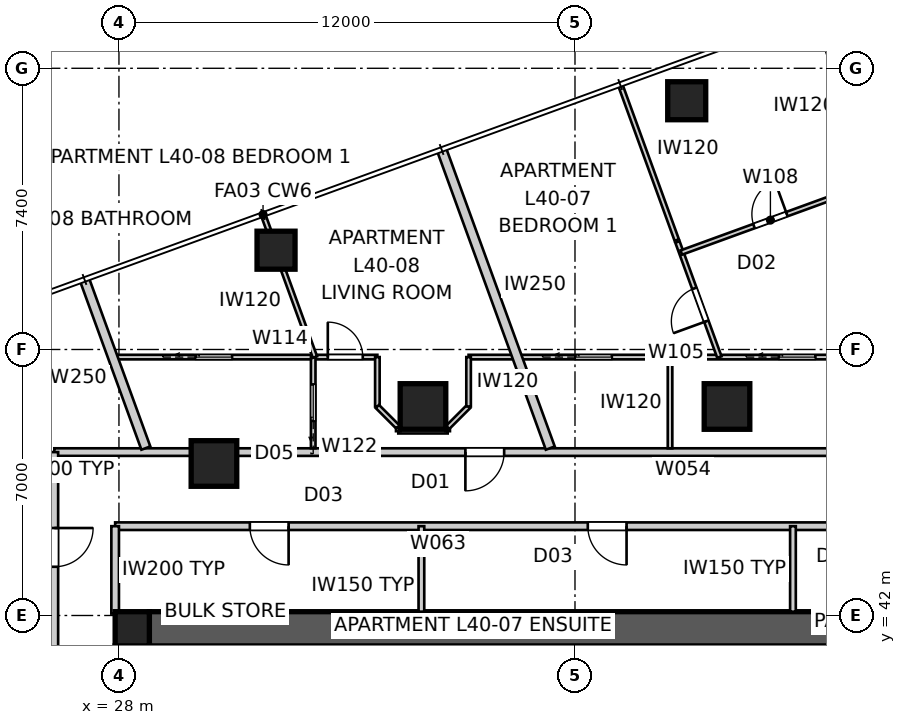
"""IFC4 building model, lengths in metres.
Left out: names, types, materials, properties, quantities, classifications, styles, units other than length and angle.
Written with IfcOpenShell. Run it as: python <this file> out.ifc"""

import sys

from ifc_helpers import new_model, si_unit, direction, frame, frame_2d, origin, origin_2d, place, context, subcontext, project, spatial, polyline, rectangle, outline, extrude, element, fill, save


model = new_model("IFC4")
c1 = context("Model", 3, precision=1e-05, world=origin(), true_north=direction((0.0, 1.0)))
c2 = subcontext(c1, "Body", "Model", "MODEL_VIEW")
j1 = project(units=[si_unit("LENGTHUNIT", "METRE"), si_unit("PLANEANGLEUNIT", "RADIAN")], contexts=[c1])
p1 = place(None, origin())
s1 = spatial("IfcSite", under=j1, at=p1, CompositionType="ELEMENT")
p2 = place(p1, origin())
s2 = spatial("IfcBuilding", under=s1, at=p2, CompositionType="ELEMENT")
p3 = place(p2, frame((0.0, 0.0, 147.2)))
s3 = spatial("IfcBuildingStorey", under=s2, at=p3, CompositionType="ELEMENT", Elevation=147.2)
p4 = place(p3, frame((28.8, 41.65, 0.0), z_axis=(0.0, 0.0, 1.0), x_axis=(1.0, 0.0, 0.0)))
e1 = element("IfcWall", 1, at=p4, inside=s3, PredefinedType="SHEAR", context=c2, shape_type="SweptSolid", body=[
    extrude(outline(polyline([(0.0, -0.45), (22.4, -0.45), (22.4, -0.025), (22.85, -0.025), (22.85, 0.025), (22.4, 0.025), (22.4, 0.45), (0.0, 0.45), (0.0, 0.025), (-0.45, 0.025), (-0.45, -0.025), (0.0, -0.025), (0.0, -0.45)])), origin(), (0.0, 0.0, 1.0), 3.4),
])
p5 = place(p3, frame((28.35, 41.2, 0.0), z_axis=(0.0, 0.0, 1.0), x_axis=(0.0, -1.0, 0.0)))
e2 = element("IfcWall", 2, at=p5, inside=s3, PredefinedType="SHEAR", context=c2, shape_type="SweptSolid", body=[
    extrude(outline(polyline([(0.0, -0.45), (22.4, -0.45), (22.4, -0.025), (22.85, -0.025), (22.85, 0.025), (22.4, 0.025), (22.4, 0.45), (0.0, 0.45), (0.0, 0.025), (-0.45, 0.025), (-0.45, -0.025), (0.0, -0.025), (0.0, -0.45)])), origin(), (0.0, 0.0, 1.0), 3.4),
])
p6 = place(p5, frame((11.14, 0.0, 0.0)))
e3 = element("IfcOpeningElement", 3, at=p6, cuts=e2, PredefinedType="OPENING", context=c2, shape_type="SweptSolid", body=[
    extrude(rectangle(XDim=1.02, YDim=2.4, at=frame_2d((0.51, 1.2))), frame((0.0, 0.46, 0.0), z_axis=(0.0, -1.0, 0.0), x_axis=(1.0, 0.0, 0.0)), (0.0, 0.0, 1.0), 0.92),
])
p7 = place(p3, frame((28.35, 41.65, 0.0), z_axis=(0.0, 0.0, 1.0), x_axis=(1.0, 0.0, 0.0)))
e4 = element("IfcColumn", 4, at=p7, inside=s3, PredefinedType="COLUMN", context=c2, shape_type="SweptSolid", body=[
    extrude(rectangle(XDim=0.9, YDim=0.9, at=origin_2d()), origin(), (0.0, 0.0, 1.0), 3.4),
])
for number, where, z_axis, x_axis in (
    (5, (42.94, 55.546, 0.0), (0.0, 0.0, 1.0), (1.0, 0.0, 0.0)),
    (6, (32.134, 51.613, 0.0), (0.0, 0.0, 1.0), (1.0, 0.0, 0.0)),
):
    element("IfcColumn", number, at=place(p3, frame(where, z_axis=z_axis, x_axis=x_axis)), inside=s3, PredefinedType="COLUMN", context=c2, shape_type="SweptSolid", body=[
        extrude(rectangle(XDim=1.0, YDim=1.0, at=origin_2d()), origin(), (0.0, 0.0, 1.0), 3.4),
    ])
for number, where, z_axis, x_axis in (
    (7, (44.0, 47.5, 0.0), (0.0, 0.0, 1.0), (1.0, 0.0, 0.0)),
    (8, (36.0, 47.5, 0.0), (0.0, 0.0, 1.0), (1.0, 0.0, 0.0)),
    (9, (30.5, 46.0, 0.0), (0.0, 0.0, 1.0), (1.0, 0.0, 0.0)),
):
    element("IfcColumn", number, at=place(p3, frame(where, z_axis=z_axis, x_axis=x_axis)), inside=s3, PredefinedType="COLUMN", context=c2, shape_type="SweptSolid", body=[
        extrude(rectangle(XDim=1.2, YDim=1.2, at=origin_2d()), origin(), (0.0, 0.0, 1.0), 3.4),
    ])
p8 = place(p3, frame((47.558, 46.3, 0.0), z_axis=(0.0, 0.0, 1.0), x_axis=(-1.0, 0.0, 0.0)))
e10 = element("IfcWall", 10, at=p8, inside=s3, PredefinedType="PARTITIONING", context=c2, shape_type="SweptSolid", body=[
    extrude(rectangle(XDim=15.117, YDim=0.2, at=frame_2d((7.558, 0.0))), origin(), (0.0, 0.0, 1.0), 3.25),
])
p9 = place(p8, frame((9.422, 0.0, 0.0)))
e11 = element("IfcOpeningElement", 11, at=p9, cuts=e10, PredefinedType="OPENING", context=c2, shape_type="SweptSolid", body=[
    extrude(rectangle(XDim=1.02, YDim=2.34, at=frame_2d((0.51, 1.17))), frame((0.0, 0.11, 0.0), z_axis=(0.0, -1.0, 0.0), x_axis=(1.0, 0.0, 0.0)), (0.0, 0.0, 1.0), 0.22),
])
p10 = place(p3, frame((32.442, 46.3, 0.0), z_axis=(0.0, 0.0, 1.0), x_axis=(-1.0, 0.0, 0.0)))
e12 = element("IfcWall", 12, at=p10, inside=s3, PredefinedType="PARTITIONING", context=c2, shape_type="SweptSolid", body=[
    extrude(rectangle(XDim=1.683, YDim=0.2, at=frame_2d((0.842, 0.0))), origin(), (0.0, 0.0, 1.0), 2.55),
])
p11 = place(p3, frame((30.758, 46.3, 0.0), z_axis=(0.0, 0.0, 1.0), x_axis=(-1.0, 0.0, 0.0)))
e13 = element("IfcWall", 13, at=p11, inside=s3, PredefinedType="PARTITIONING", context=c2, shape_type="SweptSolid", body=[
    extrude(rectangle(XDim=4.458, YDim=0.2, at=frame_2d((2.229, 0.0))), origin(), (0.0, 0.0, 1.0), 3.25),
])
p12 = place(p3, frame((26.3, 46.3, 0.0), z_axis=(0.0, 0.0, 1.0), x_axis=(0.0, -1.0, 0.0)))
e14 = element("IfcWall", 14, at=p12, inside=s3, PredefinedType="PARTITIONING", context=c2, shape_type="SweptSolid", body=[
    extrude(rectangle(XDim=33.0, YDim=0.2, at=frame_2d((16.5, 0.0))), origin(), (0.0, 0.0, 1.0), 3.25),
])
p13 = place(p12, frame((13.229, 0.0, 0.0)))
e15 = element("IfcOpeningElement", 15, at=p13, cuts=e14, PredefinedType="OPENING", context=c2, shape_type="SweptSolid", body=[
    extrude(rectangle(XDim=1.02, YDim=2.34, at=frame_2d((0.51, 1.17))), frame((0.0, 0.11, 0.0), z_axis=(0.0, -1.0, 0.0), x_axis=(1.0, 0.0, 0.0)), (0.0, 0.0, 1.0), 0.22),
])
p14 = place(p12, frame((28.51, 0.0, 0.0)))
e16 = element("IfcOpeningElement", 16, at=p14, cuts=e14, PredefinedType="OPENING", context=c2, shape_type="SweptSolid", body=[
    extrude(rectangle(XDim=1.02, YDim=2.34, at=frame_2d((0.51, 1.17))), frame((0.0, 0.11, 0.0), z_axis=(0.0, -1.0, 0.0), x_axis=(1.0, 0.0, 0.0)), (0.0, 0.0, 1.0), 0.22),
])
p15 = place(p12, frame((1.998, 0.0, 0.0)))
e17 = element("IfcOpeningElement", 17, at=p15, cuts=e14, PredefinedType="OPENING", context=c2, shape_type="SweptSolid", body=[
    extrude(rectangle(XDim=1.02, YDim=2.34, at=frame_2d((0.51, 1.17))), frame((0.0, 0.11, 0.0), z_axis=(0.0, -1.0, 0.0), x_axis=(1.0, 0.0, 0.0)), (0.0, 0.0, 1.0), 0.22),
])
p16 = place(p3, frame((36.49, 54.263, 0.0), z_axis=(0.0, 0.0, 1.0), x_axis=(0.342019678743, -0.93969278988, 0.0)))
e18 = element("IfcWall", 18, at=p16, inside=s3, PredefinedType="PARTITIONING", context=c2, shape_type="SweptSolid", body=[
    extrude(rectangle(XDim=8.362, YDim=0.25, at=frame_2d((4.181, 0.0))), origin(), (0.0, 0.0, 1.0), 3.25),
])
p17 = place(p3, frame((27.093, 50.843, 0.0), z_axis=(0.0, 0.0, 1.0), x_axis=(0.342012883883, -0.939695262975, 0.0)))
e19 = element("IfcWall", 19, at=p17, inside=s3, PredefinedType="PARTITIONING", context=c2, shape_type="SweptSolid", body=[
    extrude(rectangle(XDim=4.722, YDim=0.25, at=frame_2d((2.361, 0.0))), origin(), (0.0, 0.0, 1.0), 3.25),
])
p18 = place(p3, frame((52.1, 44.35, 0.0), z_axis=(0.0, 0.0, 1.0), x_axis=(-1.0, 0.0, 0.0)))
e20 = element("IfcWall", 20, at=p18, inside=s3, PredefinedType="PARTITIONING", context=c2, shape_type="SweptSolid", body=[
    extrude(rectangle(XDim=24.2, YDim=0.2, at=frame_2d((12.1, 0.0))), origin(), (0.0, 0.0, 1.0), 3.25),
])
p19 = place(p18, frame((10.743, 0.0, 0.0)))
e21 = element("IfcOpeningElement", 21, at=p19, cuts=e20, PredefinedType="OPENING", context=c2, shape_type="SweptSolid", body=[
    extrude(rectangle(XDim=1.02, YDim=2.1, at=frame_2d((0.51, 1.05))), frame((0.0, 0.11, 0.0), z_axis=(0.0, -1.0, 0.0), x_axis=(1.0, 0.0, 0.0)), (0.0, 0.0, 1.0), 0.22),
])
p20 = place(p18, frame((19.636, 0.0, 0.0)))
e22 = element("IfcOpeningElement", 22, at=p20, cuts=e20, PredefinedType="OPENING", context=c2, shape_type="SweptSolid", body=[
    extrude(rectangle(XDim=1.02, YDim=2.1, at=frame_2d((0.51, 1.05))), frame((0.0, 0.11, 0.0), z_axis=(0.0, -1.0, 0.0), x_axis=(1.0, 0.0, 0.0)), (0.0, 0.0, 1.0), 0.22),
])
p21 = place(p18, frame((3.297, 0.0, 0.0)))
e23 = element("IfcOpeningElement", 23, at=p21, cuts=e20, PredefinedType="OPENING", context=c2, shape_type="SweptSolid", body=[
    extrude(rectangle(XDim=1.02, YDim=2.1, at=frame_2d((0.51, 1.05))), frame((0.0, 0.11, 0.0), z_axis=(0.0, -1.0, 0.0), x_axis=(1.0, 0.0, 0.0)), (0.0, 0.0, 1.0), 0.22),
])
p22 = place(p3, frame((27.9, 44.35, 0.0), z_axis=(0.0, 0.0, 1.0), x_axis=(0.0, -1.0, 0.0)))
e24 = element("IfcWall", 24, at=p22, inside=s3, PredefinedType="PARTITIONING", context=c2, shape_type="SweptSolid", body=[
    extrude(rectangle(XDim=2.3, YDim=0.2, at=frame_2d((1.15, 0.0))), origin(), (0.0, 0.0, 1.0), 3.25),
])
p23 = place(p3, frame((35.958, 42.1, 0.0), z_axis=(0.0, 0.0, 1.0), x_axis=(0.0, 1.0, 0.0)))
e25 = element("IfcWall", 25, at=p23, inside=s3, PredefinedType="SOLIDWALL", context=c2, shape_type="SweptSolid", body=[
    extrude(rectangle(XDim=2.25, YDim=0.15, at=frame_2d((1.125, 0.0))), origin(), (0.0, 0.0, 1.0), 3.25),
])
p24 = place(p3, frame((45.735, 42.1, 0.0), z_axis=(0.0, 0.0, 1.0), x_axis=(0.0, 1.0, 0.0)))
e26 = element("IfcWall", 26, at=p24, inside=s3, PredefinedType="SOLIDWALL", context=c2, shape_type="SweptSolid", body=[
    extrude(rectangle(XDim=2.25, YDim=0.15, at=frame_2d((1.125, 0.0))), origin(), (0.0, 0.0, 1.0), 2.796),
])
p25 = place(p3, frame((42.501, 46.4, 0.0), z_axis=(0.0, 0.0, 1.0), x_axis=(0.0, 1.0, 0.0)))
e27 = element("IfcWall", 27, at=p25, inside=s3, PredefinedType="PARTITIONING", context=c2, shape_type="SweptSolid", body=[
    extrude(rectangle(XDim=2.4, YDim=0.12, at=frame_2d((1.2, 0.0))), origin(), (0.0, 0.0, 1.0), 3.25),
])
p26 = place(p3, frame((37.2, 48.8, 0.0), z_axis=(0.0, 0.0, 1.0), x_axis=(1.0, 0.0, 0.0)))
e28 = element("IfcWall", 28, at=p26, inside=s3, PredefinedType="PARTITIONING", context=c2, shape_type="SweptSolid", body=[
    extrude(rectangle(XDim=19.8, YDim=0.12, at=frame_2d((9.9, 0.0))), origin(), (0.0, 0.0, 1.0), 3.25),
])
p27 = place(p26, frame((15.403, 0.0, 0.0)))
e29 = element("IfcOpeningElement", 29, at=p27, cuts=e28, PredefinedType="OPENING", context=c2, shape_type="SweptSolid", body=[
    extrude(rectangle(XDim=0.92, YDim=2.34, at=frame_2d((0.46, 1.17))), frame((0.0, 0.07, 0.0), z_axis=(0.0, -1.0, 0.0), x_axis=(1.0, 0.0, 0.0)), (0.0, 0.0, 1.0), 0.14),
])
p28 = place(p26, frame((8.165, 0.0, 0.0)))
e30 = element("IfcOpeningElement", 30, at=p28, cuts=e28, PredefinedType="OPENING", context=c2, shape_type="SweptSolid", body=[
    extrude(rectangle(XDim=0.96, YDim=2.1, at=frame_2d((0.48, 1.05))), frame((0.0, 0.07, 0.0), z_axis=(0.0, -1.0, 0.0), x_axis=(1.0, 0.0, 0.0)), (0.0, 0.0, 1.0), 0.14),
])
p29 = place(p26, frame((2.81, 0.0, 0.0)))
e31 = element("IfcOpeningElement", 31, at=p29, cuts=e28, PredefinedType="OPENING", context=c2, shape_type="SweptSolid", body=[
    extrude(rectangle(XDim=0.96, YDim=2.1, at=frame_2d((0.48, 1.05))), frame((0.0, 0.07, 0.0), z_axis=(0.0, -1.0, 0.0), x_axis=(1.0, 0.0, 0.0)), (0.0, 0.0, 1.0), 0.14),
])
p30 = place(p3, frame((43.799, 48.8, 0.0), z_axis=(0.0, 0.0, 1.0), x_axis=(-0.342034943783, 0.939687233728, 0.0)))
e32 = element("IfcWall", 32, at=p30, inside=s3, PredefinedType="PARTITIONING", context=c2, shape_type="SweptSolid", body=[
    extrude(rectangle(XDim=3.223, YDim=0.12, at=frame_2d((1.612, 0.0))), origin(), (0.0, 0.0, 1.0), 3.25),
])
p31 = place(p30, frame((1.004, 0.0, 0.0)))
e33 = element("IfcOpeningElement", 33, at=p31, cuts=e32, PredefinedType="OPENING", context=c2, shape_type="SweptSolid", body=[
    extrude(rectangle(XDim=0.92, YDim=2.34, at=frame_2d((0.46, 1.17))), frame((0.0, 0.07, 0.0), z_axis=(0.0, -1.0, 0.0), x_axis=(1.0, 0.0, 0.0)), (0.0, 0.0, 1.0), 0.14),
])
p32 = place(p3, frame((42.798, 51.551, 0.0), z_axis=(0.0, 0.0, 1.0), x_axis=(0.939699104319, 0.342002329438, 0.0)))
e34 = element("IfcWall", 34, at=p32, inside=s3, PredefinedType="PARTITIONING", context=c2, shape_type="SweptSolid", body=[
    extrude(rectangle(XDim=4.99, YDim=0.12, at=frame_2d((2.495, 0.0))), origin(), (0.0, 0.0, 1.0), 3.25),
])
p33 = place(p32, frame((2.035, 0.0, 0.0)))
e35 = element("IfcOpeningElement", 35, at=p33, cuts=e34, PredefinedType="OPENING", context=c2, shape_type="SweptSolid", body=[
    extrude(rectangle(XDim=0.92, YDim=2.34, at=frame_2d((0.46, 1.17))), frame((0.0, 0.07, 0.0), z_axis=(0.0, -1.0, 0.0), x_axis=(1.0, 0.0, 0.0)), (0.0, 0.0, 1.0), 0.14),
])
p34 = place(p3, frame((47.796, 53.752, 0.0), z_axis=(0.0, 0.0, 1.0), x_axis=(-0.342011603146, 0.939695729113, 0.0)))
e36 = element("IfcWall", 36, at=p34, inside=s3, PredefinedType="PARTITIONING", context=c2, shape_type="SweptSolid", body=[
    extrude(rectangle(XDim=4.307, YDim=0.12, at=frame_2d((2.153, 0.0))), origin(), (0.0, 0.0, 1.0), 3.25),
])
p35 = place(p3, frame((41.202, 55.935, 0.0), z_axis=(0.0, 0.0, 1.0), x_axis=(0.341992887332, -0.939702540709, 0.0)))
e37 = element("IfcWall", 37, at=p35, inside=s3, PredefinedType="PARTITIONING", context=c2, shape_type="SweptSolid", body=[
    extrude(rectangle(XDim=4.315, YDim=0.12, at=frame_2d((2.158, 0.0))), origin(), (0.0, 0.0, 1.0), 3.25),
])
p36 = place(p3, frame((27.836, 48.8, 0.0), z_axis=(0.0, 0.0, 1.0), x_axis=(1.0, 0.0, 0.0)))
e38 = element("IfcWall", 38, at=p36, inside=s3, PredefinedType="PARTITIONING", context=c2, shape_type="SweptSolid", body=[
    extrude(rectangle(XDim=6.964, YDim=0.12, at=frame_2d((3.482, 0.0))), origin(), (0.0, 0.0, 1.0), 3.25),
])
p37 = place(p36, frame((5.659, 0.0, 0.0)))
e39 = element("IfcOpeningElement", 39, at=p37, cuts=e38, PredefinedType="OPENING", context=c2, shape_type="SweptSolid", body=[
    extrude(rectangle(XDim=0.92, YDim=2.34, at=frame_2d((0.46, 1.17))), frame((0.0, 0.07, 0.0), z_axis=(0.0, -1.0, 0.0), x_axis=(1.0, 0.0, 0.0)), (0.0, 0.0, 1.0), 0.14),
])
p38 = place(p36, frame((2.18, 0.0, 0.0)))
e40 = element("IfcOpeningElement", 40, at=p38, cuts=e38, PredefinedType="OPENING", context=c2, shape_type="SweptSolid", body=[
    extrude(rectangle(XDim=0.96, YDim=2.1, at=frame_2d((0.48, 1.05))), frame((0.0, 0.07, 0.0), z_axis=(0.0, -1.0, 0.0), x_axis=(1.0, 0.0, 0.0)), (0.0, 0.0, 1.0), 0.14),
])
p39 = place(p3, frame((34.8, 48.8, 0.0), z_axis=(0.0, 0.0, 1.0), x_axis=(0.0, -1.0, 0.0)))
e41 = element("IfcWall", 41, at=p39, inside=s3, PredefinedType="PARTITIONING", context=c2, shape_type="SweptSolid", body=[
    extrude(rectangle(XDim=1.3, YDim=0.12, at=frame_2d((0.65, 0.0))), origin(), (0.0, 0.0, 1.0), 3.25),
])
p40 = place(p3, frame((34.8, 47.5, 0.0), z_axis=(0.0, 0.0, 1.0), x_axis=(0.707106781187, -0.707106781187, 0.0)))
e42 = element("IfcWall", 42, at=p40, inside=s3, PredefinedType="PARTITIONING", context=c2, shape_type="SweptSolid", body=[
    extrude(rectangle(XDim=0.778, YDim=0.12, at=frame_2d((0.389, 0.0))), origin(), (0.0, 0.0, 1.0), 3.25),
])
p41 = place(p3, frame((35.35, 46.85, 0.0), z_axis=(0.0, 0.0, 1.0), x_axis=(1.0, 0.0, 0.0)))
e43 = element("IfcWall", 43, at=p41, inside=s3, PredefinedType="PARTITIONING", context=c2, shape_type="SweptSolid", body=[
    extrude(rectangle(XDim=1.3, YDim=0.12, at=frame_2d((0.65, 0.0))), origin(), (0.0, 0.0, 1.0), 3.25),
])
p42 = place(p3, frame((36.65, 46.95, 0.0), z_axis=(0.0, 0.0, 1.0), x_axis=(0.707106781187, 0.707106781187, 0.0)))
e44 = element("IfcWall", 44, at=p42, inside=s3, PredefinedType="PARTITIONING", context=c2, shape_type="SweptSolid", body=[
    extrude(rectangle(XDim=0.778, YDim=0.12, at=frame_2d((0.389, 0.0))), origin(), (0.0, 0.0, 1.0), 3.25),
])
p43 = place(p3, frame((37.2, 47.5, 0.0), z_axis=(0.0, 0.0, 1.0), x_axis=(0.0, 1.0, 0.0)))
e45 = element("IfcWall", 45, at=p43, inside=s3, PredefinedType="PARTITIONING", context=c2, shape_type="SweptSolid", body=[
    extrude(rectangle(XDim=1.3, YDim=0.12, at=frame_2d((0.65, 0.0))), origin(), (0.0, 0.0, 1.0), 3.25),
])
p44 = place(p3, frame((33.112, 46.4, 0.0), z_axis=(0.0, 0.0, 1.0), x_axis=(0.0, 1.0, 0.0)))
e46 = element("IfcWall", 46, at=p44, inside=s3, PredefinedType="PARTITIONING", context=c2, shape_type="SweptSolid", body=[
    extrude(rectangle(XDim=2.4, YDim=0.12, at=frame_2d((1.2, 0.0))), origin(), (0.0, 0.0, 1.0), 3.25),
])
p45 = place(p44, frame((0.72, 0.0, 0.0)))
e47 = element("IfcOpeningElement", 47, at=p45, cuts=e46, PredefinedType="OPENING", context=c2, shape_type="SweptSolid", body=[
    extrude(rectangle(XDim=0.96, YDim=2.1, at=frame_2d((0.48, 1.05))), frame((0.0, 0.07, 0.0), z_axis=(0.0, -1.0, 0.0), x_axis=(1.0, 0.0, 0.0)), (0.0, 0.0, 1.0), 0.14),
])
p46 = place(p3, frame((33.157, 48.8, 0.0), z_axis=(0.0, 0.0, 1.0), x_axis=(-0.341990966768, 0.939703239672, 0.0)))
e48 = element("IfcWall", 48, at=p46, inside=s3, PredefinedType="PARTITIONING", context=c2, shape_type="SweptSolid", body=[
    extrude(rectangle(XDim=3.953, YDim=0.12, at=frame_2d((1.977, 0.0))), origin(), (0.0, 0.0, 1.0), 3.25),
])
for number, where, z_axis, x_axis in (
    (49, (35.35, 46.85, 0.0), (0.0, 0.0, 1.0), (0.0, 1.0, 0.0)),
    (50, (36.65, 46.85, 0.0), (0.0, 0.0, 1.0), (0.0, 1.0, 0.0)),
):
    element("IfcWall", number, at=place(p3, frame(where, z_axis=z_axis, x_axis=x_axis)), inside=s3, PredefinedType="PARTITIONING", context=c2, shape_type="SweptSolid", body=[
        extrude(rectangle(XDim=0.1, YDim=0.12, at=frame_2d((0.05, 0.0))), origin(), (0.0, 0.0, 1.0), 3.25),
    ])
p47 = place(p19, origin())
e51 = element("IfcDoor", 51, at=p47, inside=s3, OperationType="SINGLE_SWING_LEFT", PredefinedType="DOOR", context=c2, shape_type="SweptSolid", body=[
    extrude(rectangle(XDim=1.02, YDim=2.1, at=frame_2d((0.51, 1.05))), frame((0.0, 0.025, 0.0), z_axis=(0.0, -1.0, 0.0), x_axis=(1.0, 0.0, 0.0)), (0.0, 0.0, 1.0), 0.05),
])
fill(e21, e51)
p48 = place(p20, origin())
e52 = element("IfcDoor", 52, at=p48, inside=s3, OperationType="SINGLE_SWING_LEFT", PredefinedType="DOOR", context=c2, shape_type="SweptSolid", body=[
    extrude(rectangle(XDim=1.02, YDim=2.1, at=frame_2d((0.51, 1.05))), frame((0.0, 0.025, 0.0), z_axis=(0.0, -1.0, 0.0), x_axis=(1.0, 0.0, 0.0)), (0.0, 0.0, 1.0), 0.05),
])
fill(e22, e52)
p49 = place(p9, origin())
e53 = element("IfcDoor", 53, at=p49, inside=s3, OperationType="SINGLE_SWING_RIGHT", PredefinedType="DOOR", context=c2, shape_type="SweptSolid", body=[
    extrude(rectangle(XDim=1.02, YDim=2.34, at=frame_2d((0.51, 1.17))), frame((0.0, 0.025, 0.0), z_axis=(0.0, -1.0, 0.0), x_axis=(1.0, 0.0, 0.0)), (0.0, 0.0, 1.0), 0.05),
])
fill(e11, e53)
p50 = place(p15, origin())
e54 = element("IfcDoor", 54, at=p50, inside=s3, OperationType="SINGLE_SWING_LEFT", PredefinedType="DOOR", context=c2, shape_type="SweptSolid", body=[
    extrude(rectangle(XDim=1.02, YDim=2.34, at=frame_2d((0.51, 1.17))), frame((0.0, 0.025, 0.0), z_axis=(0.0, -1.0, 0.0), x_axis=(1.0, 0.0, 0.0)), (0.0, 0.0, 1.0), 0.05),
])
fill(e17, e54)
p51 = place(p45, origin())
e55 = element("IfcDoor", 55, at=p51, inside=s3, OperationType="SLIDING_TO_LEFT", PredefinedType="DOOR", context=c2, shape_type="SweptSolid", body=[
    extrude(rectangle(XDim=0.96, YDim=2.1, at=frame_2d((0.48, 1.05))), frame((0.0, 0.025, 0.0), z_axis=(0.0, -1.0, 0.0), x_axis=(1.0, 0.0, 0.0)), (0.0, 0.0, 1.0), 0.05),
])
fill(e47, e55)
p52 = place(p37, origin())
e56 = element("IfcDoor", 56, at=p52, inside=s3, OperationType="SINGLE_SWING_LEFT", PredefinedType="DOOR", context=c2, shape_type="SweptSolid", body=[
    extrude(rectangle(XDim=0.92, YDim=2.34, at=frame_2d((0.46, 1.17))), frame((0.0, 0.025, 0.0), z_axis=(0.0, -1.0, 0.0), x_axis=(1.0, 0.0, 0.0)), (0.0, 0.0, 1.0), 0.05),
])
fill(e39, e56)
p53 = place(p38, origin())
e57 = element("IfcDoor", 57, at=p53, inside=s3, OperationType="SLIDING_TO_LEFT", PredefinedType="DOOR", context=c2, shape_type="SweptSolid", body=[
    extrude(rectangle(XDim=0.96, YDim=2.1, at=frame_2d((0.48, 1.05))), frame((0.0, 0.025, 0.0), z_axis=(0.0, -1.0, 0.0), x_axis=(1.0, 0.0, 0.0)), (0.0, 0.0, 1.0), 0.05),
])
fill(e40, e57)
p54 = place(p28, origin())
e58 = element("IfcDoor", 58, at=p54, inside=s3, OperationType="SLIDING_TO_LEFT", PredefinedType="DOOR", context=c2, shape_type="SweptSolid", body=[
    extrude(rectangle(XDim=0.96, YDim=2.1, at=frame_2d((0.48, 1.05))), frame((0.0, 0.025, 0.0), z_axis=(0.0, -1.0, 0.0), x_axis=(1.0, 0.0, 0.0)), (0.0, 0.0, 1.0), 0.05),
])
fill(e30, e58)
p55 = place(p33, origin())
e59 = element("IfcDoor", 59, at=p55, inside=s3, OperationType="SINGLE_SWING_RIGHT", PredefinedType="DOOR", context=c2, shape_type="SweptSolid", body=[
    extrude(rectangle(XDim=0.92, YDim=2.34, at=frame_2d((0.46, 1.17))), frame((0.0, 0.025, 0.0), z_axis=(0.0, -1.0, 0.0), x_axis=(1.0, 0.0, 0.0)), (0.0, 0.0, 1.0), 0.05),
])
fill(e35, e59)
p56 = place(p31, origin())
e60 = element("IfcDoor", 60, at=p56, inside=s3, OperationType="SINGLE_SWING_LEFT", PredefinedType="DOOR", context=c2, shape_type="SweptSolid", body=[
    extrude(rectangle(XDim=0.92, YDim=2.34, at=frame_2d((0.46, 1.17))), frame((0.0, 0.025, 0.0), z_axis=(0.0, -1.0, 0.0), x_axis=(1.0, 0.0, 0.0)), (0.0, 0.0, 1.0), 0.05),
])
fill(e33, e60)
p57 = place(p29, origin())
e61 = element("IfcDoor", 61, at=p57, inside=s3, OperationType="SLIDING_TO_LEFT", PredefinedType="DOOR", context=c2, shape_type="SweptSolid", body=[
    extrude(rectangle(XDim=0.96, YDim=2.1, at=frame_2d((0.48, 1.05))), frame((0.0, 0.025, 0.0), z_axis=(0.0, -1.0, 0.0), x_axis=(1.0, 0.0, 0.0)), (0.0, 0.0, 1.0), 0.05),
])
fill(e31, e61)
save(model, sys.argv[1])
